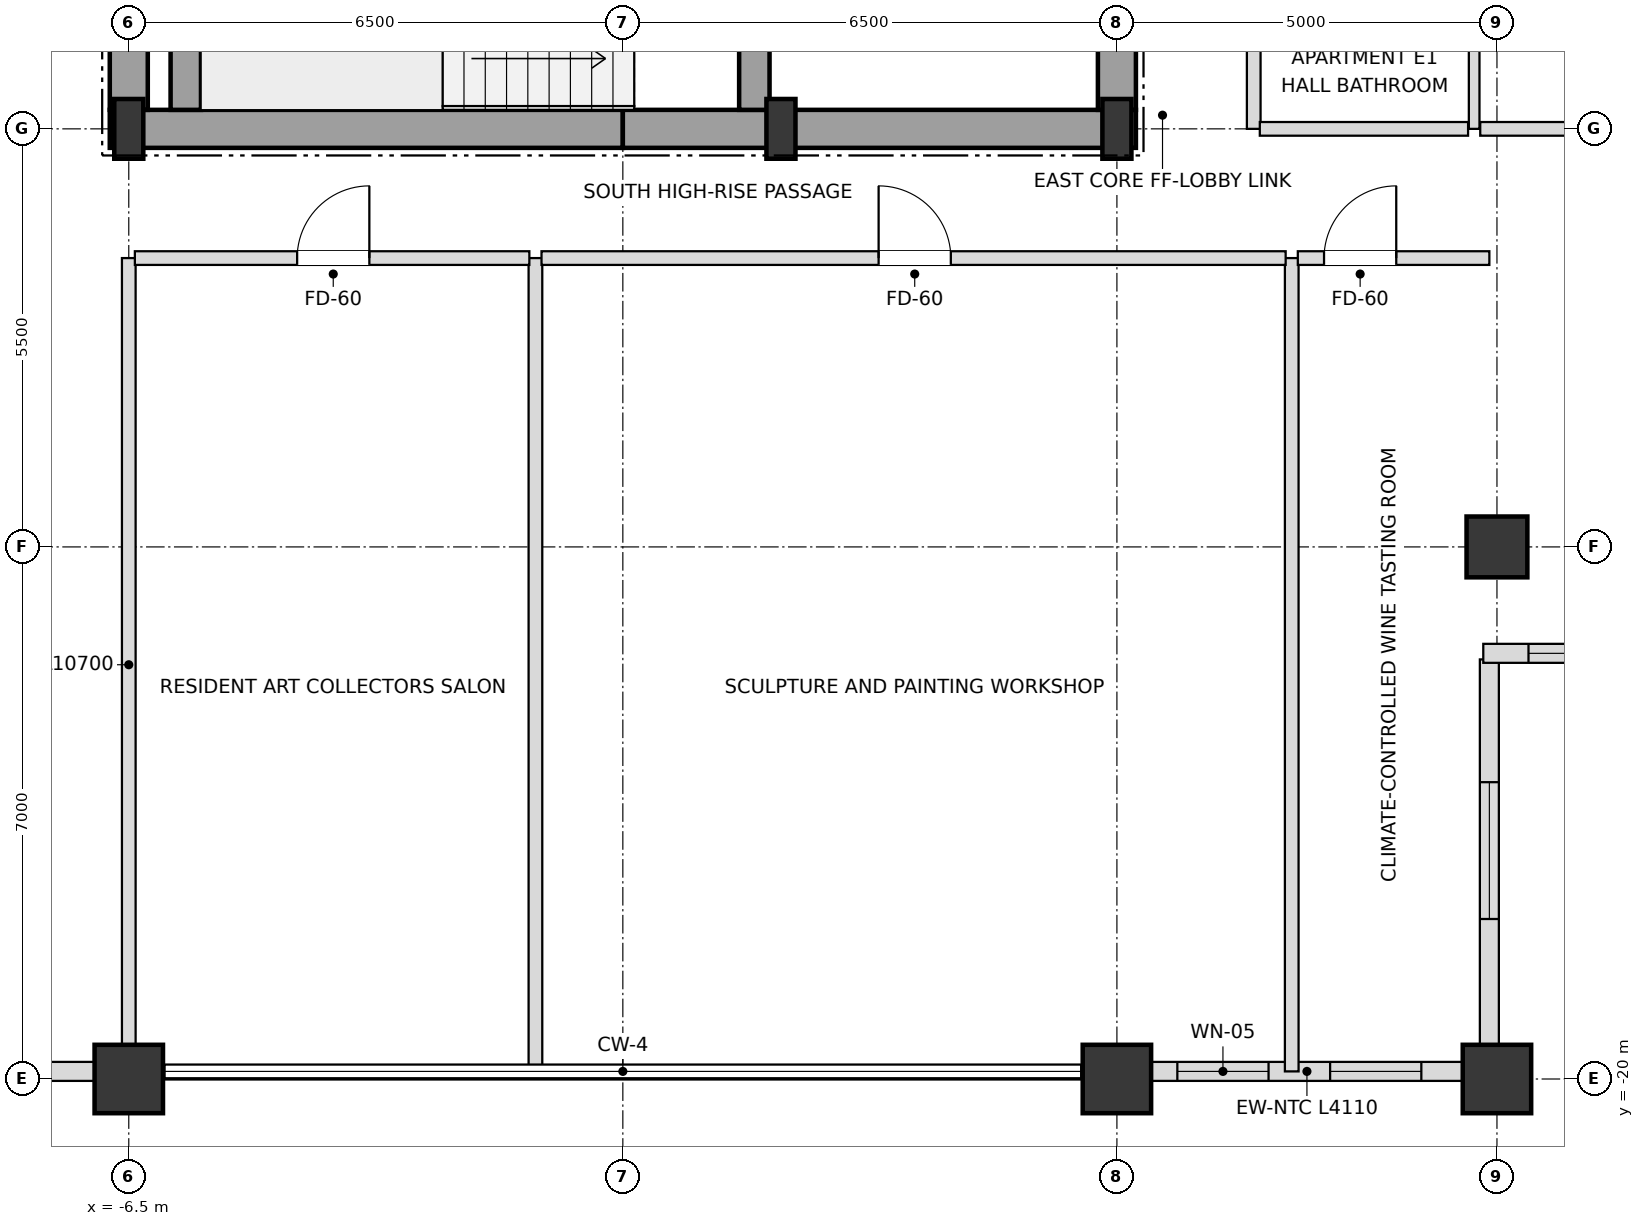
"""IFC4 building model, lengths in metres.
Left out: names, types, materials, properties, quantities, classifications, styles, units other than length and angle.
Written with IfcOpenShell. Run it as: python <this file> out.ifc"""

import sys

from ifc_helpers import new_model, si_unit, direction, frame, frame_2d, origin, origin_2d, place, context, subcontext, project, spatial, rectangle, i_section, extrude, element, fill, save


model = new_model("IFC4")
c1 = context("Model", 3, precision=1e-05, world=origin(), true_north=direction((0.0, 1.0)))
c2 = subcontext(c1, "Body", "Model", "MODEL_VIEW")
j1 = project(units=[si_unit("LENGTHUNIT", "METRE"), si_unit("PLANEANGLEUNIT", "RADIAN")], contexts=[c1])
p1 = place(None, origin())
s1 = spatial("IfcSite", under=j1, at=p1, CompositionType="ELEMENT")
p2 = place(p1, origin())
s2 = spatial("IfcBuilding", under=s1, at=p2, CompositionType="ELEMENT")
p3 = place(p2, frame((0.0, 0.0, 287.1)))
s3 = spatial("IfcBuildingStorey", under=s2, at=p3, CompositionType="ELEMENT", Elevation=287.1)
for number, where, z_axis, x_axis in (
    (1, (-6.5, -7.5, 0.0), (0.0, 0.0, 1.0), (1.0, 0.0, 0.0)),
    (2, (2.08, -7.5, 0.0), (0.0, 0.0, 1.0), (1.0, 0.0, 0.0)),
    (3, (6.5, -7.5, 0.0), (0.0, 0.0, 1.0), (1.0, 0.0, 0.0)),
):
    element("IfcColumn", number, at=place(p3, frame(where, z_axis=z_axis, x_axis=x_axis)), inside=s3, PredefinedType="COLUMN", context=c2, shape_type="SweptSolid", body=[
        extrude(i_section(OverallWidth=0.382, OverallDepth=0.786, WebThickness=0.02, FlangeThickness=0.033, at=origin_2d()), origin(), (0.0, 0.0, 1.0), 3.6),
    ])
for number, where, z_axis, x_axis in (
    (4, (-6.5, -20.0, 0.0), (0.0, 0.0, 1.0), (1.0, 0.0, 0.0)),
    (5, (6.5, -20.0, 0.0), (0.0, 0.0, 1.0), (1.0, 0.0, 0.0)),
    (6, (11.5, -20.0, 0.0), (0.0, 0.0, 1.0), (1.0, 0.0, 0.0)),
):
    element("IfcColumn", number, at=place(p3, frame(where, z_axis=z_axis, x_axis=x_axis)), inside=s3, PredefinedType="USERDEFINED", context=c2, shape_type="SweptSolid", body=[
        extrude(rectangle(XDim=0.9, YDim=0.9, at=origin_2d()), origin(), (0.0, 0.0, 1.0), 3.6),
    ])
p4 = place(p3, frame((11.5, -13.0, 0.0), z_axis=(0.0, 0.0, 1.0), x_axis=(1.0, 0.0, 0.0)))
e7 = element("IfcColumn", 7, at=p4, inside=s3, PredefinedType="COLUMN", context=c2, shape_type="SweptSolid", body=[
    extrude(rectangle(XDim=0.8, YDim=0.8, at=origin_2d()), origin(), (0.0, 0.0, 1.0), 3.6),
])
p5 = place(p3, frame((-11.055, -19.9, 0.0), z_axis=(0.0, 0.0, 1.0), x_axis=(1.0, 0.0, 0.0)))
e8 = element("IfcWall", 8, at=p5, inside=s3, PredefinedType="SOLIDWALL", context=c2, shape_type="SweptSolid", body=[
    extrude(rectangle(XDim=4.11, YDim=0.25, at=frame_2d((2.055, 0.0))), origin(), (0.0, 0.0, 1.0), 2.748),
])
p6 = place(p5, frame((1.155, 0.0, 0.72)))
e9 = element("IfcOpeningElement", 9, at=p6, cuts=e8, PredefinedType="OPENING", context=c2, shape_type="SweptSolid", body=[
    extrude(rectangle(XDim=1.8, YDim=1.68, at=frame_2d((0.9, 0.84))), frame((0.0, 0.135, 0.0), z_axis=(0.0, -1.0, 0.0), x_axis=(1.0, 0.0, 0.0)), (0.0, 0.0, 1.0), 0.27),
])
p7 = place(p3, frame((6.945, -19.9, 0.0), z_axis=(0.0, 0.0, 1.0), x_axis=(1.0, 0.0, 0.0)))
e10 = element("IfcWall", 10, at=p7, inside=s3, PredefinedType="SOLIDWALL", context=c2, shape_type="SweptSolid", body=[
    extrude(rectangle(XDim=4.11, YDim=0.25, at=frame_2d((2.055, 0.0))), origin(), (0.0, 0.0, 1.0), 2.748),
])
p8 = place(p7, frame((0.35, 0.0, 0.72)))
e11 = element("IfcOpeningElement", 11, at=p8, cuts=e10, PredefinedType="OPENING", context=c2, shape_type="SweptSolid", body=[
    extrude(rectangle(XDim=1.2, YDim=1.68, at=frame_2d((0.6, 0.84))), frame((0.0, 0.135, 0.0), z_axis=(0.0, -1.0, 0.0), x_axis=(1.0, 0.0, 0.0)), (0.0, 0.0, 1.0), 0.27),
])
p9 = place(p7, frame((2.36, 0.0, 0.72)))
e12 = element("IfcOpeningElement", 12, at=p9, cuts=e10, PredefinedType="OPENING", context=c2, shape_type="SweptSolid", body=[
    extrude(rectangle(XDim=1.2, YDim=1.68, at=frame_2d((0.6, 0.84))), frame((0.0, 0.135, 0.0), z_axis=(0.0, -1.0, 0.0), x_axis=(1.0, 0.0, 0.0)), (0.0, 0.0, 1.0), 0.27),
])
p10 = place(p3, frame((11.4, -19.82, 0.0), z_axis=(0.0, 0.0, 1.0), x_axis=(0.0, 1.0, 0.0)))
e13 = element("IfcWall", 13, at=p10, inside=s3, PredefinedType="SOLIDWALL", context=c2, shape_type="SweptSolid", body=[
    extrude(rectangle(XDim=5.34, YDim=0.25, at=frame_2d((2.67, 0.0))), origin(), (0.0, 0.0, 1.0), 2.748),
])
p11 = place(p10, frame((1.925, 0.0, 0.72)))
e14 = element("IfcOpeningElement", 14, at=p11, cuts=e13, PredefinedType="OPENING", context=c2, shape_type="SweptSolid", body=[
    extrude(rectangle(XDim=1.8, YDim=1.68, at=frame_2d((0.9, 0.84))), frame((0.0, 0.135, 0.0), z_axis=(0.0, -1.0, 0.0), x_axis=(1.0, 0.0, 0.0)), (0.0, 0.0, 1.0), 0.27),
])
p12 = place(p3, frame((11.32, -14.4, 0.0), z_axis=(0.0, 0.0, 1.0), x_axis=(1.0, 0.0, 0.0)))
e15 = element("IfcWall", 15, at=p12, inside=s3, PredefinedType="SOLIDWALL", context=c2, shape_type="SweptSolid", body=[
    extrude(rectangle(XDim=5.66, YDim=0.25, at=frame_2d((2.83, 0.0))), origin(), (0.0, 0.0, 1.0), 2.748),
])
p13 = place(p12, frame((0.595, 0.0, 0.72)))
e16 = element("IfcOpeningElement", 16, at=p13, cuts=e15, PredefinedType="OPENING", context=c2, shape_type="SweptSolid", body=[
    extrude(rectangle(XDim=1.8, YDim=1.68, at=frame_2d((0.9, 0.84))), frame((0.0, 0.135, 0.0), z_axis=(0.0, -1.0, 0.0), x_axis=(1.0, 0.0, 0.0)), (0.0, 0.0, 1.0), 0.27),
])
p14 = place(p12, frame((3.265, 0.0, 0.72)))
e17 = element("IfcOpeningElement", 17, at=p14, cuts=e15, PredefinedType="OPENING", context=c2, shape_type="SweptSolid", body=[
    extrude(rectangle(XDim=1.8, YDim=1.68, at=frame_2d((0.9, 0.84))), frame((0.0, 0.135, 0.0), z_axis=(0.0, -1.0, 0.0), x_axis=(1.0, 0.0, 0.0)), (0.0, 0.0, 1.0), 0.27),
])
for number, where, z_axis, x_axis in (
    (18, (-6.75, -7.5, 0.0), (0.0, 0.0, 1.0), (1.0, 0.0, 0.0)),
    (19, (0.0, -7.5, 0.0), (0.0, 0.0, 1.0), (1.0, 0.0, 0.0)),
):
    element("IfcWall", number, at=place(p3, frame(where, z_axis=z_axis, x_axis=x_axis)), inside=s3, PredefinedType="SHEAR", context=c2, shape_type="SweptSolid", body=[
        extrude(rectangle(XDim=6.75, YDim=0.5, at=frame_2d((3.375, 0.0))), origin(), (0.0, 0.0, 1.0), 3.38),
    ])
p15 = place(p3, frame((-6.5, -7.25, 0.0), z_axis=(0.0, 0.0, 1.0), x_axis=(0.0, 1.0, 0.0)))
e20 = element("IfcWall", 20, at=p15, inside=s3, PredefinedType="SHEAR", context=c2, shape_type="SweptSolid", body=[
    extrude(rectangle(XDim=3.55, YDim=0.5, at=frame_2d((1.775, 0.0))), origin(), (0.0, 0.0, 1.0), 3.38),
])
p16 = place(p3, frame((6.5, -7.25, 0.0), z_axis=(0.0, 0.0, 1.0), x_axis=(0.0, 1.0, 0.0)))
e21 = element("IfcWall", 21, at=p16, inside=s3, PredefinedType="SHEAR", context=c2, shape_type="SweptSolid", body=[
    extrude(rectangle(XDim=5.75, YDim=0.5, at=frame_2d((2.875, 0.0))), origin(), (0.0, 0.0, 1.0), 3.38),
])
p17 = place(p16, frame((0.85, 0.0, 0.0)))
e22 = element("IfcOpeningElement", 22, at=p17, cuts=e21, PredefinedType="OPENING", context=c2, shape_type="SweptSolid", body=[
    extrude(rectangle(XDim=1.05, YDim=2.15, at=frame_2d((0.525, 1.075))), frame((0.0, 0.26, 0.0), z_axis=(0.0, -1.0, 0.0), x_axis=(1.0, 0.0, 0.0)), (0.0, 0.0, 1.0), 0.52),
])
p18 = place(p3, frame((-5.75, -7.25, 0.0), z_axis=(0.0, 0.0, 1.0), x_axis=(0.0, 1.0, 0.0)))
e23 = element("IfcWall", 23, at=p18, inside=s3, PredefinedType="SHEAR", context=c2, shape_type="SweptSolid", body=[
    extrude(rectangle(XDim=2.9, YDim=0.4, at=frame_2d((1.45, 0.0))), origin(), (0.0, 0.0, 1.0), 3.38),
])
p19 = place(p3, frame((1.73, -7.25, 0.0), z_axis=(0.0, 0.0, 1.0), x_axis=(0.0, 1.0, 0.0)))
e24 = element("IfcWall", 24, at=p19, inside=s3, PredefinedType="SHEAR", context=c2, shape_type="SweptSolid", body=[
    extrude(rectangle(XDim=3.3, YDim=0.4, at=frame_2d((1.65, 0.0))), origin(), (0.0, 0.0, 1.0), 3.38),
])
p20 = place(p19, frame((0.9, 0.0, 0.0)))
e25 = element("IfcOpeningElement", 25, at=p20, cuts=e24, PredefinedType="OPENING", context=c2, shape_type="SweptSolid", body=[
    extrude(rectangle(XDim=1.05, YDim=2.15, at=frame_2d((0.525, 1.075))), frame((0.0, 0.21, 0.0), z_axis=(0.0, -1.0, 0.0), x_axis=(1.0, 0.0, 0.0)), (0.0, 0.0, 1.0), 0.42),
])
p21 = place(p3, frame((-6.5, -19.9, 0.0), z_axis=(0.0, 0.0, 1.0), x_axis=(0.0, 1.0, 0.0)))
e26 = element("IfcWall", 26, at=p21, inside=s3, PredefinedType="PARTITIONING", context=c2, shape_type="SweptSolid", body=[
    extrude(rectangle(XDim=10.7, YDim=0.18, at=frame_2d((5.35, 0.0))), origin(), (0.0, 0.0, 1.0), 2.826),
])
p22 = place(p3, frame((-1.15, -19.9, 0.0), z_axis=(0.0, 0.0, 1.0), x_axis=(0.0, 1.0, 0.0)))
e27 = element("IfcWall", 27, at=p22, inside=s3, PredefinedType="PARTITIONING", context=c2, shape_type="SweptSolid", body=[
    extrude(rectangle(XDim=10.7, YDim=0.18, at=frame_2d((5.35, 0.0))), origin(), (0.0, 0.0, 1.0), 3.018),
])
p23 = place(p3, frame((8.3, -7.5, 0.0), z_axis=(0.0, 0.0, 1.0), x_axis=(0.0, 1.0, 0.0)))
e28 = element("IfcWall", 28, at=p23, inside=s3, PredefinedType="PARTITIONING", context=c2, shape_type="SweptSolid", body=[
    extrude(rectangle(XDim=15.0, YDim=0.18, at=frame_2d((7.5, 0.0))), origin(), (0.0, 0.0, 1.0), 3.38),
])
p24 = place(p23, frame((2.355, 0.0, 0.0)))
e29 = element("IfcOpeningElement", 29, at=p24, cuts=e28, PredefinedType="OPENING", context=c2, shape_type="SweptSolid", body=[
    extrude(rectangle(XDim=0.95, YDim=2.15, at=frame_2d((0.475, 1.075))), frame((0.0, 0.1, 0.0), z_axis=(0.0, -1.0, 0.0), x_axis=(1.0, 0.0, 0.0)), (0.0, 0.0, 1.0), 0.2),
])
p25 = place(p3, frame((8.8, -19.9, 0.0), z_axis=(0.0, 0.0, 1.0), x_axis=(0.0, 1.0, 0.0)))
e30 = element("IfcWall", 30, at=p25, inside=s3, PredefinedType="PARTITIONING", context=c2, shape_type="SweptSolid", body=[
    extrude(rectangle(XDim=10.7, YDim=0.18, at=frame_2d((5.35, 0.0))), origin(), (0.0, 0.0, 1.0), 2.826),
])
p26 = place(p3, frame((11.2, -7.5, 0.0), z_axis=(0.0, 0.0, 1.0), x_axis=(0.0, 1.0, 0.0)))
e31 = element("IfcWall", 31, at=p26, inside=s3, PredefinedType="PARTITIONING", context=c2, shape_type="SweptSolid", body=[
    extrude(rectangle(XDim=15.0, YDim=0.14, at=frame_2d((7.5, 0.0))), origin(), (0.0, 0.0, 1.0), 3.38),
])
p27 = place(p26, frame((3.475, 0.0, 0.0)))
e32 = element("IfcOpeningElement", 32, at=p27, cuts=e31, PredefinedType="OPENING", context=c2, shape_type="SweptSolid", body=[
    extrude(rectangle(XDim=0.95, YDim=2.1, at=frame_2d((0.475, 1.05))), frame((0.0, 0.08, 0.0), z_axis=(0.0, -1.0, 0.0), x_axis=(1.0, 0.0, 0.0)), (0.0, 0.0, 1.0), 0.16),
])
p28 = place(p3, frame((-6.42, -9.2, 0.0), z_axis=(0.0, 0.0, 1.0), x_axis=(1.0, 0.0, 0.0)))
e33 = element("IfcWall", 33, at=p28, inside=s3, PredefinedType="PARTITIONING", context=c2, shape_type="SweptSolid", body=[
    extrude(rectangle(XDim=5.19, YDim=0.18, at=frame_2d((2.595, 0.0))), origin(), (0.0, 0.0, 1.0), 3.38),
])
p29 = place(p28, frame((2.135, 0.0, 0.0)))
e34 = element("IfcOpeningElement", 34, at=p29, cuts=e33, PredefinedType="OPENING", context=c2, shape_type="SweptSolid", body=[
    extrude(rectangle(XDim=0.95, YDim=2.15, at=frame_2d((0.475, 1.075))), frame((0.0, 0.1, 0.0), z_axis=(0.0, -1.0, 0.0), x_axis=(1.0, 0.0, 0.0)), (0.0, 0.0, 1.0), 0.2),
])
p30 = place(p3, frame((-1.07, -9.2, 0.0), z_axis=(0.0, 0.0, 1.0), x_axis=(1.0, 0.0, 0.0)))
e35 = element("IfcWall", 35, at=p30, inside=s3, PredefinedType="PARTITIONING", context=c2, shape_type="SweptSolid", body=[
    extrude(rectangle(XDim=9.79, YDim=0.18, at=frame_2d((4.895, 0.0))), origin(), (0.0, 0.0, 1.0), 2.826),
])
p31 = place(p30, frame((4.435, 0.0, 0.0)))
e36 = element("IfcOpeningElement", 36, at=p31, cuts=e35, PredefinedType="OPENING", context=c2, shape_type="SweptSolid", body=[
    extrude(rectangle(XDim=0.95, YDim=2.15, at=frame_2d((0.475, 1.075))), frame((0.0, 0.1, 0.0), z_axis=(0.0, -1.0, 0.0), x_axis=(1.0, 0.0, 0.0)), (0.0, 0.0, 1.0), 0.2),
])
p32 = place(p3, frame((8.88, -9.2, 0.0), z_axis=(0.0, 0.0, 1.0), x_axis=(1.0, 0.0, 0.0)))
e37 = element("IfcWall", 37, at=p32, inside=s3, PredefinedType="PARTITIONING", context=c2, shape_type="SweptSolid", body=[
    extrude(rectangle(XDim=2.52, YDim=0.18, at=frame_2d((1.26, 0.0))), origin(), (0.0, 0.0, 1.0), 3.38),
])
p33 = place(p32, frame((0.345, 0.0, 0.0)))
e38 = element("IfcOpeningElement", 38, at=p33, cuts=e37, PredefinedType="OPENING", context=c2, shape_type="SweptSolid", body=[
    extrude(rectangle(XDim=0.95, YDim=2.15, at=frame_2d((0.475, 1.075))), frame((0.0, 0.1, 0.0), z_axis=(0.0, -1.0, 0.0), x_axis=(1.0, 0.0, 0.0)), (0.0, 0.0, 1.0), 0.2),
])
p34 = place(p3, frame((8.38, -7.5, 0.0), z_axis=(0.0, 0.0, 1.0), x_axis=(1.0, 0.0, 0.0)))
e39 = element("IfcWall", 39, at=p34, inside=s3, PredefinedType="PARTITIONING", context=c2, shape_type="SweptSolid", body=[
    extrude(rectangle(XDim=2.74, YDim=0.18, at=frame_2d((1.37, 0.0))), origin(), (0.0, 0.0, 1.0), 2.826),
])
p35 = place(p3, frame((11.28, -7.5, 0.0), z_axis=(0.0, 0.0, 1.0), x_axis=(1.0, 0.0, 0.0)))
e40 = element("IfcWall", 40, at=p35, inside=s3, PredefinedType="PARTITIONING", context=c2, shape_type="SweptSolid", body=[
    extrude(rectangle(XDim=5.62, YDim=0.18, at=frame_2d((2.81, 0.0))), origin(), (0.0, 0.0, 1.0), 2.826),
])
p36 = place(p8, origin())
e41 = element("IfcWindow", 41, at=p36, inside=s3, PartitioningType="SINGLE_PANEL", PredefinedType="WINDOW", context=c2, shape_type="SweptSolid", body=[
    extrude(rectangle(XDim=1.2, YDim=1.68, at=frame_2d((0.6, 0.84))), frame((0.0, 0.03, 0.0), z_axis=(0.0, -1.0, 0.0), x_axis=(1.0, 0.0, 0.0)), (0.0, 0.0, 1.0), 0.06),
])
fill(e11, e41)
p37 = place(p9, origin())
e42 = element("IfcWindow", 42, at=p37, inside=s3, PartitioningType="SINGLE_PANEL", PredefinedType="WINDOW", context=c2, shape_type="SweptSolid", body=[
    extrude(rectangle(XDim=1.2, YDim=1.68, at=frame_2d((0.6, 0.84))), frame((0.0, 0.03, 0.0), z_axis=(0.0, -1.0, 0.0), x_axis=(1.0, 0.0, 0.0)), (0.0, 0.0, 1.0), 0.06),
])
fill(e12, e42)
p38 = place(p11, origin())
e43 = element("IfcWindow", 43, at=p38, inside=s3, PartitioningType="SINGLE_PANEL", PredefinedType="WINDOW", context=c2, shape_type="SweptSolid", body=[
    extrude(rectangle(XDim=1.8, YDim=1.68, at=frame_2d((0.9, 0.84))), frame((0.0, 0.03, 0.0), z_axis=(0.0, -1.0, 0.0), x_axis=(1.0, 0.0, 0.0)), (0.0, 0.0, 1.0), 0.06),
])
fill(e14, e43)
p39 = place(p13, origin())
e44 = element("IfcWindow", 44, at=p39, inside=s3, PartitioningType="SINGLE_PANEL", PredefinedType="WINDOW", context=c2, shape_type="SweptSolid", body=[
    extrude(rectangle(XDim=1.8, YDim=1.68, at=frame_2d((0.9, 0.84))), frame((0.0, 0.03, 0.0), z_axis=(0.0, -1.0, 0.0), x_axis=(1.0, 0.0, 0.0)), (0.0, 0.0, 1.0), 0.06),
])
fill(e16, e44)
p40 = place(p29, origin())
e45 = element("IfcDoor", 45, at=p40, inside=s3, OperationType="SINGLE_SWING_RIGHT", PredefinedType="DOOR", context=c2, shape_type="SweptSolid", body=[
    extrude(rectangle(XDim=0.95, YDim=2.15, at=frame_2d((0.475, 1.075))), frame((0.0, 0.025, 0.0), z_axis=(0.0, -1.0, 0.0), x_axis=(1.0, 0.0, 0.0)), (0.0, 0.0, 1.0), 0.05),
])
fill(e34, e45)
p41 = place(p31, origin())
e46 = element("IfcDoor", 46, at=p41, inside=s3, OperationType="SINGLE_SWING_LEFT", PredefinedType="DOOR", context=c2, shape_type="SweptSolid", body=[
    extrude(rectangle(XDim=0.95, YDim=2.15, at=frame_2d((0.475, 1.075))), frame((0.0, 0.025, 0.0), z_axis=(0.0, -1.0, 0.0), x_axis=(1.0, 0.0, 0.0)), (0.0, 0.0, 1.0), 0.05),
])
fill(e36, e46)
p42 = place(p33, origin())
e47 = element("IfcDoor", 47, at=p42, inside=s3, OperationType="SINGLE_SWING_RIGHT", PredefinedType="DOOR", context=c2, shape_type="SweptSolid", body=[
    extrude(rectangle(XDim=0.95, YDim=2.15, at=frame_2d((0.475, 1.075))), frame((0.0, 0.025, 0.0), z_axis=(0.0, -1.0, 0.0), x_axis=(1.0, 0.0, 0.0)), (0.0, 0.0, 1.0), 0.05),
])
fill(e38, e47)
save(model, sys.argv[1])
